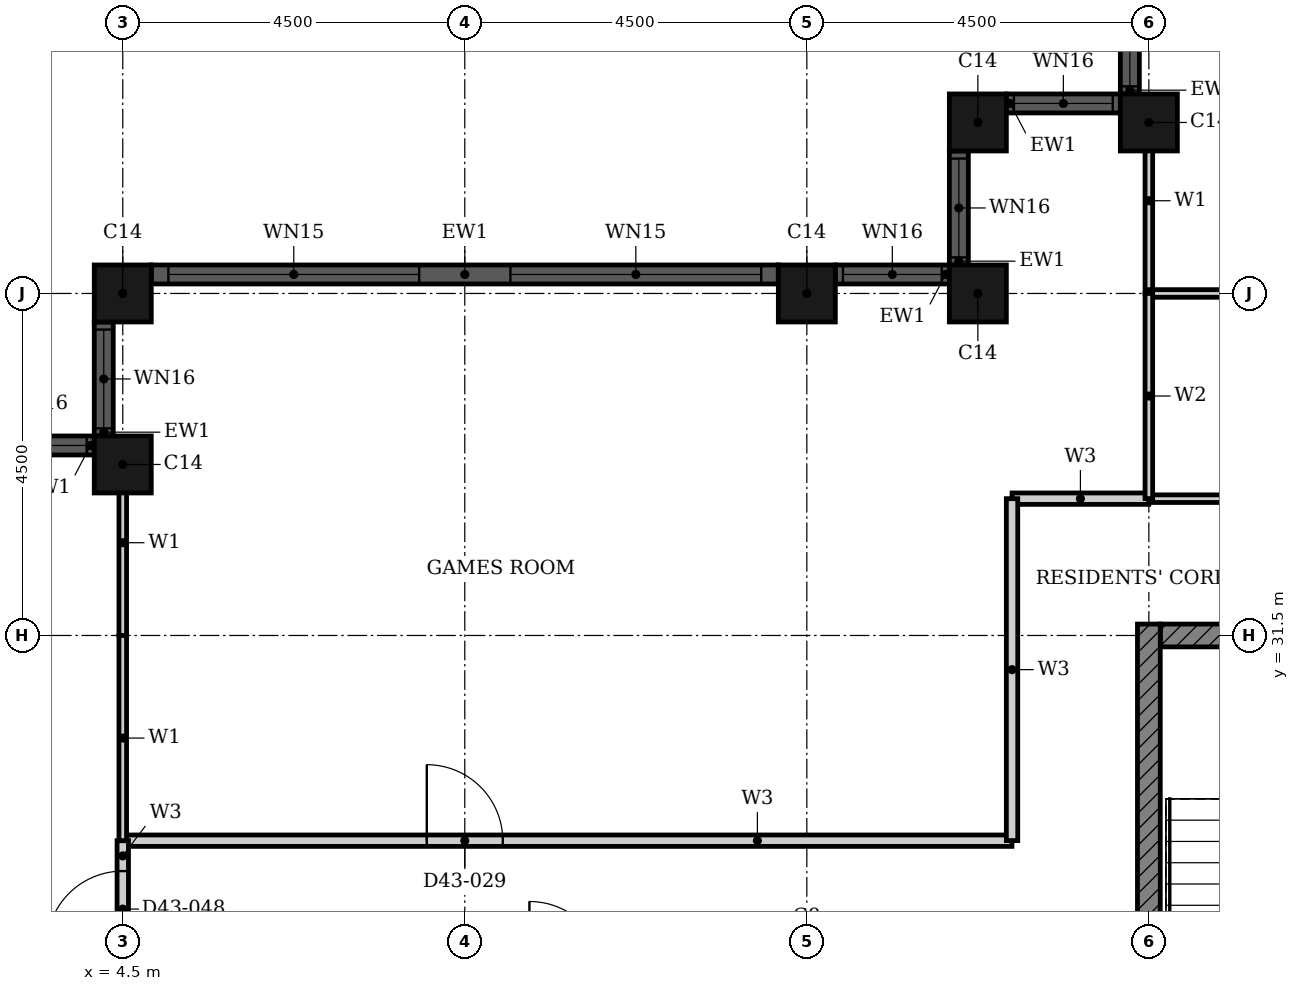
"""IFC4 building model, lengths in metres.
Left out: names, types, materials, properties, quantities, classifications, styles, units other than length and angle.
Written with IfcOpenShell. Run it as: python <this file> out.ifc"""

import sys

from ifc_helpers import new_model, si_unit, direction, frame, frame_2d, origin, origin_2d, place, context, subcontext, project, spatial, rectangle, hollow_rectangle, extrude, element, fill, save


model = new_model("IFC4")
c1 = context("Model", 3, precision=1e-05, world=origin(), true_north=direction((0.0, 1.0)))
c2 = subcontext(c1, "Body", "Model", "MODEL_VIEW")
j1 = project(units=[si_unit("LENGTHUNIT", "METRE"), si_unit("PLANEANGLEUNIT", "RADIAN")], contexts=[c1])
p1 = place(None, origin())
s1 = spatial("IfcSite", under=j1, at=p1, CompositionType="ELEMENT")
p2 = place(p1, origin())
s2 = spatial("IfcBuilding", under=s1, at=p2, CompositionType="ELEMENT")
p3 = place(p2, frame((0.0, 0.0, 172.8)))
s3 = spatial("IfcBuildingStorey", under=s2, at=p3, CompositionType="ELEMENT", Elevation=172.8)
for number, where, z_axis, x_axis in (
    (1, (18.0, 38.25, 0.0), (0.0, 0.0, 1.0), (1.0, 0.0, 0.0)),
    (2, (15.75, 38.25, 0.0), (0.0, 0.0, 1.0), (1.0, 0.0, 0.0)),
    (3, (15.75, 36.0, 0.0), (0.0, 0.0, 1.0), (1.0, 0.0, 0.0)),
    (4, (13.5, 36.0, 0.0), (0.0, 0.0, 1.0), (1.0, 0.0, 0.0)),
    (5, (4.5, 36.0, 0.0), (0.0, 0.0, 1.0), (1.0, 0.0, 0.0)),
    (6, (4.5, 33.75, 0.0), (0.0, 0.0, 1.0), (1.0, 0.0, 0.0)),
):
    element("IfcColumn", number, at=place(p3, frame(where, z_axis=z_axis, x_axis=x_axis)), inside=s3, PredefinedType="COLUMN", context=c2, shape_type="SweptSolid", body=[
        extrude(hollow_rectangle(XDim=0.75, YDim=0.75, WallThickness=0.024, at=origin_2d()), origin(), (0.0, 0.0, 1.0), 3.7),
    ])
p4 = place(p3, frame((17.75, 40.125, 0.0), z_axis=(0.0, 0.0, 1.0), x_axis=(0.0, -1.0, 0.0)))
e7 = element("IfcWall", 7, at=p4, inside=s3, PredefinedType="SOLIDWALL", context=c2, shape_type="SweptSolid", body=[
    extrude(rectangle(XDim=1.5, YDim=0.25, at=frame_2d((0.75, 0.0))), origin(), (0.0, 0.0, 1.0), 3.7),
])
p5 = place(p4, frame((0.1, 0.0, 0.9)))
e8 = element("IfcOpeningElement", 8, at=p5, cuts=e7, PredefinedType="OPENING", context=c2, shape_type="SweptSolid", body=[
    extrude(rectangle(XDim=1.3, YDim=1.85, at=frame_2d((0.65, 0.925))), frame((0.0, 0.135, 0.0), z_axis=(0.0, -1.0, 0.0), x_axis=(1.0, 0.0, 0.0)), (0.0, 0.0, 1.0), 0.27),
])
p6 = place(p3, frame((17.625, 38.5, 0.0), z_axis=(0.0, 0.0, 1.0), x_axis=(-1.0, 0.0, 0.0)))
e9 = element("IfcWall", 9, at=p6, inside=s3, PredefinedType="SOLIDWALL", context=c2, shape_type="SweptSolid", body=[
    extrude(rectangle(XDim=1.5, YDim=0.25, at=frame_2d((0.75, 0.0))), origin(), (0.0, 0.0, 1.0), 3.7),
])
p7 = place(p6, frame((0.1, 0.0, 0.9)))
e10 = element("IfcOpeningElement", 10, at=p7, cuts=e9, PredefinedType="OPENING", context=c2, shape_type="SweptSolid", body=[
    extrude(rectangle(XDim=1.3, YDim=1.85, at=frame_2d((0.65, 0.925))), frame((0.0, 0.135, 0.0), z_axis=(0.0, -1.0, 0.0), x_axis=(1.0, 0.0, 0.0)), (0.0, 0.0, 1.0), 0.27),
])
p8 = place(p3, frame((15.5, 37.875, 0.0), z_axis=(0.0, 0.0, 1.0), x_axis=(0.0, -1.0, 0.0)))
e11 = element("IfcWall", 11, at=p8, inside=s3, PredefinedType="SOLIDWALL", context=c2, shape_type="SweptSolid", body=[
    extrude(rectangle(XDim=1.5, YDim=0.25, at=frame_2d((0.75, 0.0))), origin(), (0.0, 0.0, 1.0), 3.7),
])
p9 = place(p8, frame((0.1, 0.0, 0.9)))
e12 = element("IfcOpeningElement", 12, at=p9, cuts=e11, PredefinedType="OPENING", context=c2, shape_type="SweptSolid", body=[
    extrude(rectangle(XDim=1.3, YDim=1.85, at=frame_2d((0.65, 0.925))), frame((0.0, 0.135, 0.0), z_axis=(0.0, -1.0, 0.0), x_axis=(1.0, 0.0, 0.0)), (0.0, 0.0, 1.0), 0.27),
])
p10 = place(p3, frame((15.375, 36.25, 0.0), z_axis=(0.0, 0.0, 1.0), x_axis=(-1.0, 0.0, 0.0)))
e13 = element("IfcWall", 13, at=p10, inside=s3, PredefinedType="SOLIDWALL", context=c2, shape_type="SweptSolid", body=[
    extrude(rectangle(XDim=1.5, YDim=0.25, at=frame_2d((0.75, 0.0))), origin(), (0.0, 0.0, 1.0), 3.7),
])
p11 = place(p10, frame((0.1, 0.0, 0.9)))
e14 = element("IfcOpeningElement", 14, at=p11, cuts=e13, PredefinedType="OPENING", context=c2, shape_type="SweptSolid", body=[
    extrude(rectangle(XDim=1.3, YDim=1.85, at=frame_2d((0.65, 0.925))), frame((0.0, 0.135, 0.0), z_axis=(0.0, -1.0, 0.0), x_axis=(1.0, 0.0, 0.0)), (0.0, 0.0, 1.0), 0.27),
])
p12 = place(p3, frame((13.125, 36.25, 0.0), z_axis=(0.0, 0.0, 1.0), x_axis=(-1.0, 0.0, 0.0)))
e15 = element("IfcWall", 15, at=p12, inside=s3, PredefinedType="SOLIDWALL", context=c2, shape_type="SweptSolid", body=[
    extrude(rectangle(XDim=8.25, YDim=0.25, at=frame_2d((4.125, 0.0))), origin(), (0.0, 0.0, 1.0), 3.7),
])
p13 = place(p12, frame((0.225, 0.0, 0.45)))
e16 = element("IfcOpeningElement", 16, at=p13, cuts=e15, PredefinedType="OPENING", context=c2, shape_type="SweptSolid", body=[
    extrude(rectangle(XDim=3.3, YDim=2.3, at=frame_2d((1.65, 1.15))), frame((0.0, 0.135, 0.0), z_axis=(0.0, -1.0, 0.0), x_axis=(1.0, 0.0, 0.0)), (0.0, 0.0, 1.0), 0.27),
])
p14 = place(p12, frame((4.725, 0.0, 0.45)))
e17 = element("IfcOpeningElement", 17, at=p14, cuts=e15, PredefinedType="OPENING", context=c2, shape_type="SweptSolid", body=[
    extrude(rectangle(XDim=3.3, YDim=2.3, at=frame_2d((1.65, 1.15))), frame((0.0, 0.135, 0.0), z_axis=(0.0, -1.0, 0.0), x_axis=(1.0, 0.0, 0.0)), (0.0, 0.0, 1.0), 0.27),
])
p15 = place(p3, frame((4.25, 35.625, 0.0), z_axis=(0.0, 0.0, 1.0), x_axis=(0.0, -1.0, 0.0)))
e18 = element("IfcWall", 18, at=p15, inside=s3, PredefinedType="SOLIDWALL", context=c2, shape_type="SweptSolid", body=[
    extrude(rectangle(XDim=1.5, YDim=0.25, at=frame_2d((0.75, 0.0))), origin(), (0.0, 0.0, 1.0), 3.7),
])
p16 = place(p15, frame((0.1, 0.0, 0.9)))
e19 = element("IfcOpeningElement", 19, at=p16, cuts=e18, PredefinedType="OPENING", context=c2, shape_type="SweptSolid", body=[
    extrude(rectangle(XDim=1.3, YDim=1.85, at=frame_2d((0.65, 0.925))), frame((0.0, 0.135, 0.0), z_axis=(0.0, -1.0, 0.0), x_axis=(1.0, 0.0, 0.0)), (0.0, 0.0, 1.0), 0.27),
])
p17 = place(p3, frame((4.125, 34.0, 0.0), z_axis=(0.0, 0.0, 1.0), x_axis=(-1.0, 0.0, 0.0)))
e20 = element("IfcWall", 20, at=p17, inside=s3, PredefinedType="SOLIDWALL", context=c2, shape_type="SweptSolid", body=[
    extrude(rectangle(XDim=1.5, YDim=0.25, at=frame_2d((0.75, 0.0))), origin(), (0.0, 0.0, 1.0), 3.7),
])
p18 = place(p17, frame((0.1, 0.0, 0.9)))
e21 = element("IfcOpeningElement", 21, at=p18, cuts=e20, PredefinedType="OPENING", context=c2, shape_type="SweptSolid", body=[
    extrude(rectangle(XDim=1.3, YDim=1.85, at=frame_2d((0.65, 0.925))), frame((0.0, 0.135, 0.0), z_axis=(0.0, -1.0, 0.0), x_axis=(1.0, 0.0, 0.0)), (0.0, 0.0, 1.0), 0.27),
])
p19 = place(p3, frame((18.15, 31.5, 0.0), z_axis=(0.0, 0.0, 1.0), x_axis=(1.0, 0.0, 0.0)))
e22 = element("IfcWall", 22, at=p19, inside=s3, PredefinedType="SHEAR", context=c2, shape_type="SweptSolid", body=[
    extrude(rectangle(XDim=9.368, YDim=0.3, at=frame_2d((4.684, 0.0))), origin(), (0.0, 0.0, 1.0), 3.4),
])
p20 = place(p19, frame((4.736, 0.0, 0.0)))
e23 = element("IfcOpeningElement", 23, at=p20, cuts=e22, PredefinedType="OPENING", context=c2, shape_type="SweptSolid", body=[
    extrude(rectangle(XDim=1.8, YDim=2.1, at=frame_2d((0.9, 1.05))), frame((0.0, 0.16, 0.0), z_axis=(0.0, -1.0, 0.0), x_axis=(1.0, 0.0, 0.0)), (0.0, 0.0, 1.0), 0.32),
])
p21 = place(p3, frame((18.0, 22.35, 0.0), z_axis=(0.0, 0.0, 1.0), x_axis=(0.0, 1.0, 0.0)))
e24 = element("IfcWall", 24, at=p21, inside=s3, PredefinedType="SHEAR", context=c2, shape_type="SweptSolid", body=[
    extrude(rectangle(XDim=9.3, YDim=0.3, at=frame_2d((4.65, 0.0))), origin(), (0.0, 0.0, 1.0), 3.4),
])
p22 = place(p3, frame((4.5, 28.8, 0.0), z_axis=(0.0, 0.0, 1.0), x_axis=(1.0, 0.0, 0.0)))
e25 = element("IfcWall", 25, at=p22, inside=s3, PredefinedType="PARTITIONING", context=c2, shape_type="SweptSolid", body=[
    extrude(rectangle(XDim=11.699, YDim=0.15, at=frame_2d((5.85, 0.0))), origin(), (0.0, 0.0, 1.0), 3.4),
])
p23 = place(p22, frame((4.0, 0.0, 0.0)))
e26 = element("IfcOpeningElement", 26, at=p23, cuts=e25, PredefinedType="OPENING", context=c2, shape_type="SweptSolid", body=[
    extrude(rectangle(XDim=1.0, YDim=2.1, at=frame_2d((0.5, 1.05))), frame((0.0, 0.085, 0.0), z_axis=(0.0, -1.0, 0.0), x_axis=(1.0, 0.0, 0.0)), (0.0, 0.0, 1.0), 0.17),
])
p24 = place(p3, frame((16.2, 33.3, 0.0), z_axis=(0.0, 0.0, 1.0), x_axis=(1.0, 0.0, 0.0)))
e27 = element("IfcWall", 27, at=p24, inside=s3, PredefinedType="PARTITIONING", context=c2, shape_type="SweptSolid", body=[
    extrude(rectangle(XDim=1.799, YDim=0.15, at=frame_2d((0.899, 0.0))), origin(), (0.0, 0.0, 1.0), 3.4),
])
p25 = place(p3, frame((16.2, 28.801, 0.0), z_axis=(0.0, 0.0, 1.0), x_axis=(0.0, 1.0, 0.0)))
e28 = element("IfcWall", 28, at=p25, inside=s3, PredefinedType="PARTITIONING", context=c2, shape_type="SweptSolid", body=[
    extrude(rectangle(XDim=4.499, YDim=0.15, at=frame_2d((2.25, 0.0))), origin(), (0.0, 0.0, 1.0), 3.4),
])
p26 = place(p3, frame((4.5, 27.0, 0.0), z_axis=(0.0, 0.0, 1.0), x_axis=(0.0, 1.0, 0.0)))
e29 = element("IfcWall", 29, at=p26, inside=s3, PredefinedType="PARTITIONING", context=c2, shape_type="SweptSolid", body=[
    extrude(rectangle(XDim=1.8, YDim=0.15, at=frame_2d((0.9, 0.0))), origin(), (0.0, 0.0, 1.0), 3.4),
])
p27 = place(p26, frame((0.4, 0.0, 0.0)))
e30 = element("IfcOpeningElement", 30, at=p27, cuts=e29, PredefinedType="OPENING", context=c2, shape_type="SweptSolid", body=[
    extrude(rectangle(XDim=1.0, YDim=2.2, at=frame_2d((0.5, 1.1))), frame((0.0, 0.085, 0.0), z_axis=(0.0, -1.0, 0.0), x_axis=(1.0, 0.0, 0.0)), (0.0, 0.0, 1.0), 0.17),
])
p28 = place(p3, frame((18.0, 36.0, 0.0), z_axis=(0.0, 0.0, 1.0), x_axis=(0.0, 1.0, 0.0)))
e31 = element("IfcWall", 31, at=p28, inside=s3, PredefinedType="PARTITIONING", context=c2, shape_type="SweptSolid", body=[
    extrude(rectangle(XDim=2.44, YDim=0.1, at=frame_2d((1.22, 0.0))), origin(), (0.0, 0.0, 1.0), 3.4),
])
p29 = place(p3, frame((4.5, 28.8, 0.0), z_axis=(0.0, 0.0, 1.0), x_axis=(0.0, 1.0, 0.0)))
e32 = element("IfcWall", 32, at=p29, inside=s3, PredefinedType="PARTITIONING", context=c2, shape_type="SweptSolid", body=[
    extrude(rectangle(XDim=2.7, YDim=0.1, at=frame_2d((1.35, 0.0))), origin(), (0.0, 0.0, 1.0), 3.4),
])
p30 = place(p3, frame((4.5, 31.501, 0.0), z_axis=(0.0, 0.0, 1.0), x_axis=(0.0, 1.0, 0.0)))
e33 = element("IfcWall", 33, at=p30, inside=s3, PredefinedType="PARTITIONING", context=c2, shape_type="SweptSolid", body=[
    extrude(rectangle(XDim=2.439, YDim=0.1, at=frame_2d((1.219, 0.0))), origin(), (0.0, 0.0, 1.0), 3.4),
])
p31 = place(p3, frame((18.0, 33.3, 0.0), z_axis=(0.0, 0.0, 1.0), x_axis=(1.0, 0.0, 0.0)))
e34 = element("IfcWall", 34, at=p31, inside=s3, PredefinedType="PARTITIONING", context=c2, shape_type="SweptSolid", body=[
    extrude(rectangle(XDim=3.6, YDim=0.1, at=frame_2d((1.8, 0.0))), origin(), (0.0, 0.0, 1.0), 3.4),
])
p32 = place(p3, frame((18.0, 36.0, 0.0), z_axis=(0.0, 0.0, 1.0), x_axis=(1.0, 0.0, 0.0)))
e35 = element("IfcWall", 35, at=p32, inside=s3, PredefinedType="PARTITIONING", context=c2, shape_type="SweptSolid", body=[
    extrude(rectangle(XDim=3.6, YDim=0.1, at=frame_2d((1.8, 0.0))), origin(), (0.0, 0.0, 1.0), 3.4),
])
p33 = place(p32, frame((1.4, 0.0, 0.0)))
e36 = element("IfcOpeningElement", 36, at=p33, cuts=e35, PredefinedType="OPENING", context=c2, shape_type="SweptSolid", body=[
    extrude(rectangle(XDim=0.8, YDim=2.1, at=frame_2d((0.4, 1.05))), frame((0.0, 0.06, 0.0), z_axis=(0.0, -1.0, 0.0), x_axis=(1.0, 0.0, 0.0)), (0.0, 0.0, 1.0), 0.12),
])
p34 = place(p3, frame((18.0, 33.301, 0.0), z_axis=(0.0, 0.0, 1.0), x_axis=(0.0, 1.0, 0.0)))
e37 = element("IfcWall", 37, at=p34, inside=s3, PredefinedType="PARTITIONING", context=c2, shape_type="SweptSolid", body=[
    extrude(rectangle(XDim=2.699, YDim=0.1, at=frame_2d((1.35, 0.0))), origin(), (0.0, 0.0, 1.0), 3.4),
])
p35 = place(p5, origin())
e38 = element("IfcWindow", 38, at=p35, inside=s3, PartitioningType="SINGLE_PANEL", PredefinedType="WINDOW", context=c2, shape_type="SweptSolid", body=[
    extrude(rectangle(XDim=1.3, YDim=1.85, at=frame_2d((0.65, 0.925))), frame((0.0, 0.03, 0.0), z_axis=(0.0, -1.0, 0.0), x_axis=(1.0, 0.0, 0.0)), (0.0, 0.0, 1.0), 0.06),
])
fill(e8, e38)
p36 = place(p7, origin())
e39 = element("IfcWindow", 39, at=p36, inside=s3, PartitioningType="SINGLE_PANEL", PredefinedType="WINDOW", context=c2, shape_type="SweptSolid", body=[
    extrude(rectangle(XDim=1.3, YDim=1.85, at=frame_2d((0.65, 0.925))), frame((0.0, 0.03, 0.0), z_axis=(0.0, -1.0, 0.0), x_axis=(1.0, 0.0, 0.0)), (0.0, 0.0, 1.0), 0.06),
])
fill(e10, e39)
p37 = place(p9, origin())
e40 = element("IfcWindow", 40, at=p37, inside=s3, PartitioningType="SINGLE_PANEL", PredefinedType="WINDOW", context=c2, shape_type="SweptSolid", body=[
    extrude(rectangle(XDim=1.3, YDim=1.85, at=frame_2d((0.65, 0.925))), frame((0.0, 0.03, 0.0), z_axis=(0.0, -1.0, 0.0), x_axis=(1.0, 0.0, 0.0)), (0.0, 0.0, 1.0), 0.06),
])
fill(e12, e40)
p38 = place(p11, origin())
e41 = element("IfcWindow", 41, at=p38, inside=s3, PartitioningType="SINGLE_PANEL", PredefinedType="WINDOW", context=c2, shape_type="SweptSolid", body=[
    extrude(rectangle(XDim=1.3, YDim=1.85, at=frame_2d((0.65, 0.925))), frame((0.0, 0.03, 0.0), z_axis=(0.0, -1.0, 0.0), x_axis=(1.0, 0.0, 0.0)), (0.0, 0.0, 1.0), 0.06),
])
fill(e14, e41)
p39 = place(p13, origin())
e42 = element("IfcWindow", 42, at=p39, inside=s3, PartitioningType="SINGLE_PANEL", PredefinedType="WINDOW", context=c2, shape_type="SweptSolid", body=[
    extrude(rectangle(XDim=3.3, YDim=2.3, at=frame_2d((1.65, 1.15))), frame((0.0, 0.03, 0.0), z_axis=(0.0, -1.0, 0.0), x_axis=(1.0, 0.0, 0.0)), (0.0, 0.0, 1.0), 0.06),
])
fill(e16, e42)
p40 = place(p14, origin())
e43 = element("IfcWindow", 43, at=p40, inside=s3, PartitioningType="SINGLE_PANEL", PredefinedType="WINDOW", context=c2, shape_type="SweptSolid", body=[
    extrude(rectangle(XDim=3.3, YDim=2.3, at=frame_2d((1.65, 1.15))), frame((0.0, 0.03, 0.0), z_axis=(0.0, -1.0, 0.0), x_axis=(1.0, 0.0, 0.0)), (0.0, 0.0, 1.0), 0.06),
])
fill(e17, e43)
p41 = place(p16, origin())
e44 = element("IfcWindow", 44, at=p41, inside=s3, PartitioningType="SINGLE_PANEL", PredefinedType="WINDOW", context=c2, shape_type="SweptSolid", body=[
    extrude(rectangle(XDim=1.3, YDim=1.85, at=frame_2d((0.65, 0.925))), frame((0.0, 0.03, 0.0), z_axis=(0.0, -1.0, 0.0), x_axis=(1.0, 0.0, 0.0)), (0.0, 0.0, 1.0), 0.06),
])
fill(e19, e44)
p42 = place(p18, origin())
e45 = element("IfcWindow", 45, at=p42, inside=s3, PartitioningType="SINGLE_PANEL", PredefinedType="WINDOW", context=c2, shape_type="SweptSolid", body=[
    extrude(rectangle(XDim=1.3, YDim=1.85, at=frame_2d((0.65, 0.925))), frame((0.0, 0.03, 0.0), z_axis=(0.0, -1.0, 0.0), x_axis=(1.0, 0.0, 0.0)), (0.0, 0.0, 1.0), 0.06),
])
fill(e21, e45)
p43 = place(p23, origin())
e46 = element("IfcDoor", 46, at=p43, inside=s3, OperationType="SINGLE_SWING_LEFT", PredefinedType="DOOR", context=c2, shape_type="SweptSolid", body=[
    extrude(rectangle(XDim=1.0, YDim=2.1, at=frame_2d((0.5, 1.05))), frame((0.0, 0.025, 0.0), z_axis=(0.0, -1.0, 0.0), x_axis=(1.0, 0.0, 0.0)), (0.0, 0.0, 1.0), 0.05),
])
fill(e26, e46)
p44 = place(p27, origin())
e47 = element("IfcDoor", 47, at=p44, inside=s3, OperationType="SINGLE_SWING_RIGHT", PredefinedType="DOOR", context=c2, shape_type="SweptSolid", body=[
    extrude(rectangle(XDim=1.0, YDim=2.2, at=frame_2d((0.5, 1.1))), frame((0.0, 0.025, 0.0), z_axis=(0.0, -1.0, 0.0), x_axis=(1.0, 0.0, 0.0)), (0.0, 0.0, 1.0), 0.05),
])
fill(e30, e47)
save(model, sys.argv[1])
